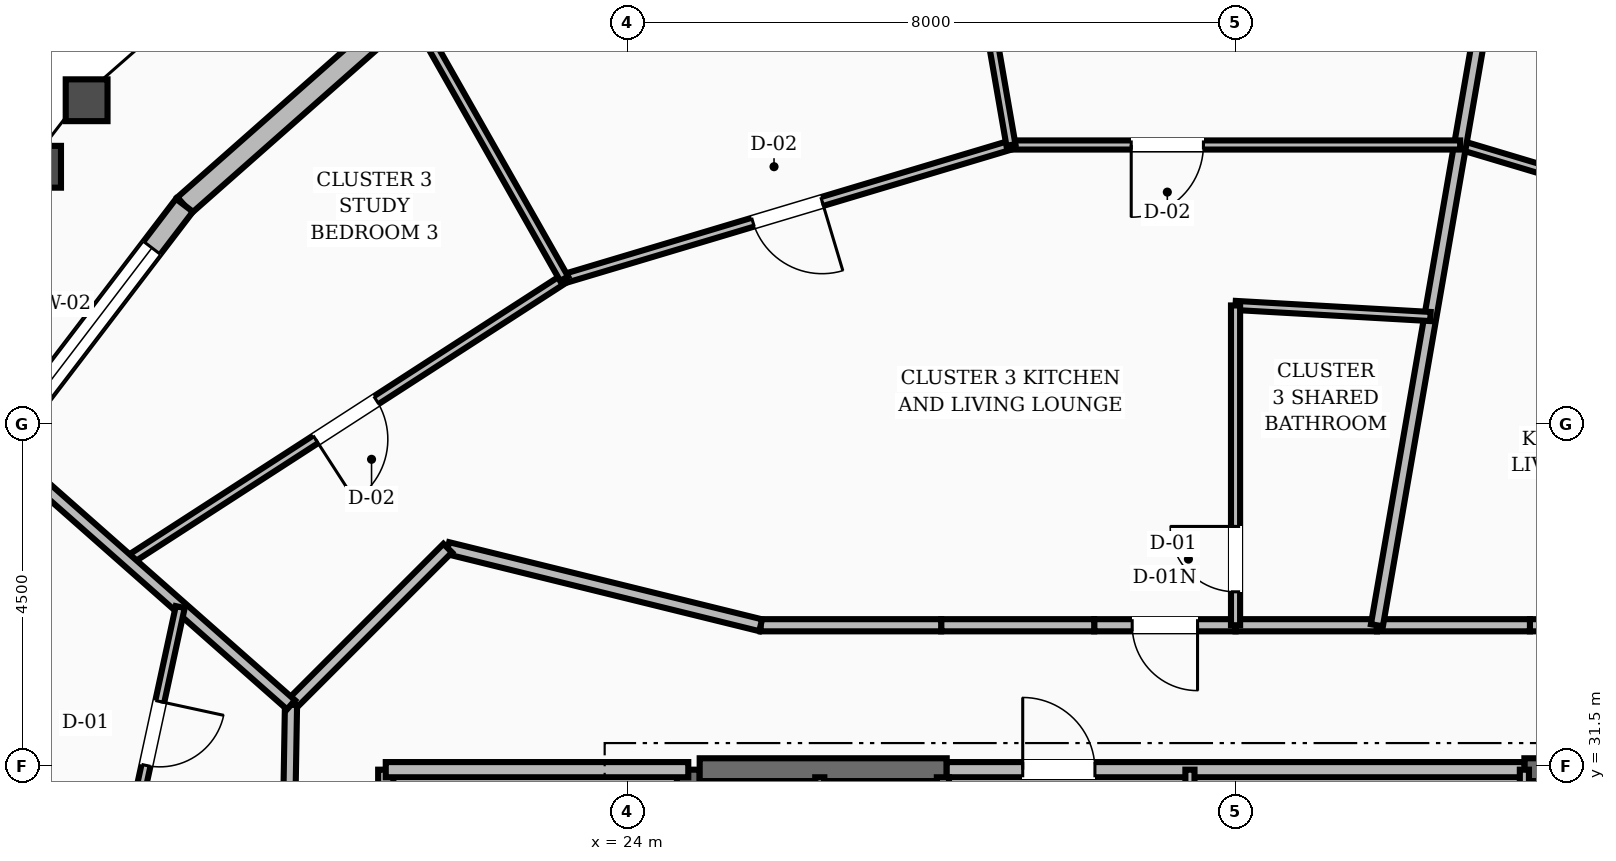
"""IFC4 building model, lengths in metres.
Left out: names, types, materials, properties, quantities, classifications, styles, units other than length and angle.
Written with IfcOpenShell. Run it as: python <this file> out.ifc"""

import sys

from ifc_helpers import new_model, si_unit, direction, frame, frame_2d, origin, place, context, subcontext, project, spatial, rectangle, extrude, element, fill, save


model = new_model("IFC4")
c1 = context("Model", 3, precision=1e-05, world=origin(), true_north=direction((0.0, 1.0)))
c2 = subcontext(c1, "Body", "Model", "MODEL_VIEW")
j1 = project(units=[si_unit("LENGTHUNIT", "METRE"), si_unit("PLANEANGLEUNIT", "RADIAN")], contexts=[c1])
p1 = place(None, origin())
s1 = spatial("IfcSite", under=j1, at=p1, CompositionType="ELEMENT")
p2 = place(p1, origin())
s2 = spatial("IfcBuilding", under=s1, at=p2, CompositionType="ELEMENT")
p3 = place(p2, frame((0.0, 0.0, 268.8)))
s3 = spatial("IfcBuildingStorey", under=s2, at=p3, CompositionType="ELEMENT", Elevation=268.8)
p4 = place(p3, frame((24.8, 25.15, 0.0), z_axis=(0.0, 0.0, 1.0), x_axis=(0.0, 1.0, 0.0)))
e1 = element("IfcWall", 1, at=p4, inside=s3, PredefinedType="SHEAR", context=c2, shape_type="SweptSolid", body=[
    extrude(rectangle(XDim=6.3, YDim=0.3, at=frame_2d((3.15, 0.0))), origin(), (0.0, 0.0, 1.0), 3.6),
])
p5 = place(p3, frame((24.95, 31.45, 0.0), z_axis=(0.0, 0.0, 1.0), x_axis=(1.0, 0.0, 0.0)))
e2 = element("IfcWall", 2, at=p5, inside=s3, PredefinedType="SHEAR", context=c2, shape_type="SweptSolid", body=[
    extrude(rectangle(XDim=3.25, YDim=0.3, at=frame_2d((1.625, 0.0))), origin(), (0.0, 0.0, 1.0), 3.6),
])
p6 = place(p3, frame((35.8, 31.45, 0.0), z_axis=(0.0, 0.0, 1.0), x_axis=(1.0, 0.0, 0.0)))
e3 = element("IfcWall", 3, at=p6, inside=s3, PredefinedType="SHEAR", context=c2, shape_type="SweptSolid", body=[
    extrude(rectangle(XDim=3.25, YDim=0.3, at=frame_2d((1.625, 0.0))), origin(), (0.0, 0.0, 1.0), 3.6),
])
p7 = place(p6, frame((0.3, 0.0, 0.0)))
e4 = element("IfcOpeningElement", 4, at=p7, cuts=e3, PredefinedType="OPENING", context=c2, shape_type="SweptSolid", body=[
    extrude(rectangle(XDim=1.1, YDim=2.1, at=frame_2d((0.55, 1.05))), frame((0.0, 0.16, 0.0), z_axis=(0.0, -1.0, 0.0), x_axis=(1.0, 0.0, 0.0)), (0.0, 0.0, 1.0), 0.32),
])
p8 = place(p3, frame((21.135, 41.492, 0.0), z_axis=(0.0, 0.0, 1.0), x_axis=(-0.749653985562, -0.661829964515, 0.0)))
e5 = element("IfcWall", 5, at=p8, inside=s3, PredefinedType="STANDARD", context=c2, shape_type="SweptSolid", body=[
    extrude(rectangle(XDim=3.953, YDim=0.28, at=frame_2d((1.977, 0.0))), origin(), (0.0, 0.0, 1.0), 2.88),
])
p9 = place(p3, frame((18.171, 38.875, 0.0), z_axis=(0.0, 0.0, 1.0), x_axis=(-0.606584214855, -0.795019238942, 0.0)))
e6 = element("IfcWall", 6, at=p9, inside=s3, PredefinedType="STANDARD", context=c2, shape_type="SweptSolid", body=[
    extrude(rectangle(XDim=4.01, YDim=0.28, at=frame_2d((2.005, 0.0))), origin(), (0.0, 0.0, 1.0), 2.88),
])
p10 = place(p9, frame((0.705, 0.0, 0.8)))
e7 = element("IfcOpeningElement", 7, at=p10, cuts=e6, PredefinedType="OPENING", context=c2, shape_type="SweptSolid", body=[
    extrude(rectangle(XDim=2.6, YDim=1.65, at=frame_2d((1.3, 0.825))), frame((0.0, 0.15, 0.0), z_axis=(0.0, -1.0, 0.0), x_axis=(1.0, 0.0, 0.0)), (0.0, 0.0, 1.0), 0.3),
])
p11 = place(p3, frame((20.82, 28.32, 0.0), z_axis=(0.0, 0.0, 1.0), x_axis=(0.0, 1.0, 0.0)))
e8 = element("IfcWall", 8, at=p11, inside=s3, PredefinedType="SOLIDWALL", context=c2, shape_type="SweptSolid", body=[
    extrude(rectangle(XDim=3.13, YDim=0.2, at=frame_2d((1.565, 0.0))), origin(), (0.0, 0.0, 1.0), 2.87),
])
p12 = place(p11, frame((1.09, 0.0, 0.0)))
e9 = element("IfcOpeningElement", 9, at=p12, cuts=e8, PredefinedType="OPENING", context=c2, shape_type="SweptSolid", body=[
    extrude(rectangle(XDim=0.95, YDim=2.1, at=frame_2d((0.475, 1.05))), frame((0.0, 0.11, 0.0), z_axis=(0.0, -1.0, 0.0), x_axis=(1.0, 0.0, 0.0)), (0.0, 0.0, 1.0), 0.22),
])
p13 = place(p3, frame((20.82, 31.45, 0.0), z_axis=(0.0, 0.0, 1.0), x_axis=(1.0, 0.0, 0.0)))
e10 = element("IfcWall", 10, at=p13, inside=s3, PredefinedType="SOLIDWALL", context=c2, shape_type="SweptSolid", body=[
    extrude(rectangle(XDim=3.98, YDim=0.2, at=frame_2d((1.99, 0.0))), origin(), (0.0, 0.0, 1.0), 2.87),
])
p14 = place(p3, frame((28.2, 31.45, 0.0), z_axis=(0.0, 0.0, 1.0), x_axis=(1.0, 0.0, 0.0)))
e11 = element("IfcWall", 11, at=p14, inside=s3, PredefinedType="SOLIDWALL", context=c2, shape_type="SweptSolid", body=[
    extrude(rectangle(XDim=7.6, YDim=0.2, at=frame_2d((3.8, 0.0))), origin(), (0.0, 0.0, 1.0), 2.87),
])
p15 = place(p14, frame((1.0, 0.0, 0.0)))
e12 = element("IfcOpeningElement", 12, at=p15, cuts=e11, PredefinedType="OPENING", context=c2, shape_type="SweptSolid", body=[
    extrude(rectangle(XDim=0.95, YDim=2.1, at=frame_2d((0.475, 1.05))), frame((0.0, 0.11, 0.0), z_axis=(0.0, -1.0, 0.0), x_axis=(1.0, 0.0, 0.0)), (0.0, 0.0, 1.0), 0.22),
])
p16 = place(p3, frame((35.8, 27.95, 0.0), z_axis=(0.0, 0.0, 1.0), x_axis=(0.0, 1.0, 0.0)))
e13 = element("IfcWall", 13, at=p16, inside=s3, PredefinedType="PARTITIONING", context=c2, shape_type="SweptSolid", body=[
    extrude(rectangle(XDim=3.5, YDim=0.12, at=frame_2d((1.75, 0.0))), origin(), (0.0, 0.0, 1.0), 2.87),
])
p17 = place(p16, frame((1.275, 0.0, 0.0)))
e14 = element("IfcOpeningElement", 14, at=p17, cuts=e13, PredefinedType="OPENING", context=c2, shape_type="SweptSolid", body=[
    extrude(rectangle(XDim=0.95, YDim=2.1, at=frame_2d((0.475, 1.05))), frame((0.0, 0.07, 0.0), z_axis=(0.0, -1.0, 0.0), x_axis=(1.0, 0.0, 0.0)), (0.0, 0.0, 1.0), 0.14),
])
p18 = place(p3, frame((31.4, 27.95, 0.0), z_axis=(0.0, 0.0, 1.0), x_axis=(0.0, 1.0, 0.0)))
e15 = element("IfcWall", 15, at=p18, inside=s3, PredefinedType="PARTITIONING", context=c2, shape_type="SweptSolid", body=[
    extrude(rectangle(XDim=3.5, YDim=0.12, at=frame_2d((1.75, 0.0))), origin(), (0.0, 0.0, 1.0), 2.87),
])
p19 = place(p3, frame((28.15, 25.25, 0.0), z_axis=(0.0, 0.0, 1.0), x_axis=(0.0, 1.0, 0.0)))
e16 = element("IfcWall", 16, at=p19, inside=s3, PredefinedType="SOLIDWALL", context=c2, shape_type="SweptSolid", body=[
    extrude(rectangle(XDim=6.1, YDim=0.16, at=frame_2d((3.05, 0.0))), origin(), (0.0, 0.0, 1.0), 2.87),
])
p20 = place(p3, frame((26.53, 25.25, 0.0), z_axis=(0.0, 0.0, 1.0), x_axis=(0.0, 1.0, 0.0)))
e17 = element("IfcWall", 17, at=p20, inside=s3, PredefinedType="PARTITIONING", context=c2, shape_type="SweptSolid", body=[
    extrude(rectangle(XDim=6.1, YDim=0.12, at=frame_2d((3.05, 0.0))), origin(), (0.0, 0.0, 1.0), 2.87),
])
p21 = place(p3, frame((38.248, 33.35, 0.0), z_axis=(0.0, 0.0, 1.0), x_axis=(-1.0, 0.0, 0.0)))
e18 = element("IfcWall", 18, at=p21, inside=s3, PredefinedType="SOLIDWALL", context=c2, shape_type="SweptSolid", body=[
    extrude(rectangle(XDim=2.375, YDim=0.16, at=frame_2d((1.188, 0.0))), origin(), (0.0, 0.0, 1.0), 2.87),
])
p22 = place(p3, frame((35.873, 33.35, 0.0), z_axis=(0.0, 0.0, 1.0), x_axis=(-1.0, 0.0, 0.0)))
e19 = element("IfcWall", 19, at=p22, inside=s3, PredefinedType="SOLIDWALL", context=c2, shape_type="SweptSolid", body=[
    extrude(rectangle(XDim=2.013, YDim=0.16, at=frame_2d((1.006, 0.0))), origin(), (0.0, 0.0, 1.0), 2.87),
])
p23 = place(p3, frame((33.86, 33.35, 0.0), z_axis=(0.0, 0.0, 1.0), x_axis=(-1.0, 0.0, 0.0)))
e20 = element("IfcWall", 20, at=p23, inside=s3, PredefinedType="SOLIDWALL", context=c2, shape_type="SweptSolid", body=[
    extrude(rectangle(XDim=1.86, YDim=0.16, at=frame_2d((0.93, 0.0))), origin(), (0.0, 0.0, 1.0), 2.87),
])
p24 = place(p3, frame((32.0, 33.35, 0.0), z_axis=(0.0, 0.0, 1.0), x_axis=(-1.0, 0.0, 0.0)))
e21 = element("IfcWall", 21, at=p24, inside=s3, PredefinedType="SOLIDWALL", context=c2, shape_type="SweptSolid", body=[
    extrude(rectangle(XDim=1.86, YDim=0.16, at=frame_2d((0.93, 0.0))), origin(), (0.0, 0.0, 1.0), 2.87),
])
p25 = place(p24, frame((0.5, 0.0, 0.0)))
e22 = element("IfcOpeningElement", 22, at=p25, cuts=e21, PredefinedType="OPENING", context=c2, shape_type="SweptSolid", body=[
    extrude(rectangle(XDim=0.86, YDim=2.1, at=frame_2d((0.43, 1.05))), frame((0.0, 0.09, 0.0), z_axis=(0.0, -1.0, 0.0), x_axis=(1.0, 0.0, 0.0)), (0.0, 0.0, 1.0), 0.18),
])
p26 = place(p3, frame((30.14, 33.35, 0.0), z_axis=(0.0, 0.0, 1.0), x_axis=(-1.0, 0.0, 0.0)))
e23 = element("IfcWall", 23, at=p26, inside=s3, PredefinedType="SOLIDWALL", context=c2, shape_type="SweptSolid", body=[
    extrude(rectangle(XDim=2.013, YDim=0.16, at=frame_2d((1.006, 0.0))), origin(), (0.0, 0.0, 1.0), 2.87),
])
p27 = place(p3, frame((28.127, 33.35, 0.0), z_axis=(0.0, 0.0, 1.0), x_axis=(-1.0, 0.0, 0.0)))
e24 = element("IfcWall", 24, at=p27, inside=s3, PredefinedType="SOLIDWALL", context=c2, shape_type="SweptSolid", body=[
    extrude(rectangle(XDim=2.375, YDim=0.16, at=frame_2d((1.188, 0.0))), origin(), (0.0, 0.0, 1.0), 2.87),
])
p28 = place(p3, frame((25.752, 33.35, 0.0), z_axis=(0.0, 0.0, 1.0), x_axis=(-0.970939799552, 0.239323850978, 0.0)))
e25 = element("IfcWall", 25, at=p28, inside=s3, PredefinedType="SOLIDWALL", context=c2, shape_type="SweptSolid", body=[
    extrude(rectangle(XDim=4.241, YDim=0.16, at=frame_2d((2.12, 0.0))), origin(), (0.0, 0.0, 1.0), 2.87),
])
p29 = place(p3, frame((21.635, 34.365, 0.0), z_axis=(0.0, 0.0, 1.0), x_axis=(-0.707106781187, -0.707106781187, 0.0)))
e26 = element("IfcWall", 26, at=p29, inside=s3, PredefinedType="SOLIDWALL", context=c2, shape_type="SweptSolid", body=[
    extrude(rectangle(XDim=2.916, YDim=0.16, at=frame_2d((1.458, 0.0))), origin(), (0.0, 0.0, 1.0), 2.87),
])
p30 = place(p3, frame((19.573, 32.303, 0.0), z_axis=(0.0, 0.0, 1.0), x_axis=(-0.016981035134, -0.999855811828, 0.0)))
e27 = element("IfcWall", 27, at=p30, inside=s3, PredefinedType="SOLIDWALL", context=c2, shape_type="SweptSolid", body=[
    extrude(rectangle(XDim=3.134, YDim=0.16, at=frame_2d((1.567, 0.0))), origin(), (0.0, 0.0, 1.0), 2.87),
])
p31 = place(p3, frame((40.833, 37.909, 0.0), z_axis=(0.0, 0.0, 1.0), x_axis=(-0.958019889786, 0.28670174533, 0.0)))
e28 = element("IfcWall", 28, at=p31, inside=s3, PredefinedType="PARTITIONING", context=c2, shape_type="SweptSolid", body=[
    extrude(rectangle(XDim=6.136, YDim=0.12, at=frame_2d((3.068, 0.0))), origin(), (0.0, 0.0, 1.0), 2.87),
])
p32 = place(p31, frame((2.593, 0.0, 0.0)))
e29 = element("IfcOpeningElement", 29, at=p32, cuts=e28, PredefinedType="OPENING", context=c2, shape_type="SweptSolid", body=[
    extrude(rectangle(XDim=0.95, YDim=2.1, at=frame_2d((0.475, 1.05))), frame((0.0, 0.07, 0.0), z_axis=(0.0, -1.0, 0.0), x_axis=(1.0, 0.0, 0.0)), (0.0, 0.0, 1.0), 0.14),
])
p33 = place(p3, frame((33.86, 33.35, 0.0), z_axis=(0.0, 0.0, 1.0), x_axis=(0.170778130505, 0.98530950982, 0.0)))
e30 = element("IfcWall", 30, at=p33, inside=s3, PredefinedType="SOLIDWALL", context=c2, shape_type="SweptSolid", body=[
    extrude(rectangle(XDim=11.401, YDim=0.16, at=frame_2d((5.7, 0.0))), origin(), (0.0, 0.0, 1.0), 2.87),
])
p34 = place(p3, frame((34.564, 37.412, 0.0), z_axis=(0.0, 0.0, 1.0), x_axis=(-0.998393230763, 0.056665304784, 0.0)))
e31 = element("IfcWall", 31, at=p34, inside=s3, PredefinedType="PARTITIONING", context=c2, shape_type="SweptSolid", body=[
    extrude(rectangle(XDim=2.568, YDim=0.12, at=frame_2d((1.284, 0.0))), origin(), (0.0, 0.0, 1.0), 2.87),
])
p35 = place(p3, frame((32.0, 33.35, 0.0), z_axis=(0.0, 0.0, 1.0), x_axis=(0.0, 1.0, 0.0)))
e32 = element("IfcWall", 32, at=p35, inside=s3, PredefinedType="PARTITIONING", context=c2, shape_type="SweptSolid", body=[
    extrude(rectangle(XDim=4.207, YDim=0.12, at=frame_2d((2.104, 0.0))), origin(), (0.0, 0.0, 1.0), 2.87),
])
p36 = place(p35, frame((0.44, 0.0, 0.0)))
e33 = element("IfcOpeningElement", 33, at=p36, cuts=e32, PredefinedType="OPENING", context=c2, shape_type="SweptSolid", body=[
    extrude(rectangle(XDim=0.86, YDim=2.1, at=frame_2d((0.43, 1.05))), frame((0.0, 0.07, 0.0), z_axis=(0.0, -1.0, 0.0), x_axis=(1.0, 0.0, 0.0)), (0.0, 0.0, 1.0), 0.14),
])
p37 = place(p3, frame((34.955, 39.668, 0.0), z_axis=(0.0, 0.0, 1.0), x_axis=(-1.0, 0.0, 0.0)))
e34 = element("IfcWall", 34, at=p37, inside=s3, PredefinedType="PARTITIONING", context=c2, shape_type="SweptSolid", body=[
    extrude(rectangle(XDim=5.91, YDim=0.12, at=frame_2d((2.955, 0.0))), origin(), (0.0, 0.0, 1.0), 2.87),
])
p38 = place(p37, frame((3.377, 0.0, 0.0)))
e35 = element("IfcOpeningElement", 35, at=p38, cuts=e34, PredefinedType="OPENING", context=c2, shape_type="SweptSolid", body=[
    extrude(rectangle(XDim=0.95, YDim=2.1, at=frame_2d((0.475, 1.05))), frame((0.0, 0.07, 0.0), z_axis=(0.0, -1.0, 0.0), x_axis=(1.0, 0.0, 0.0)), (0.0, 0.0, 1.0), 0.14),
])
p39 = place(p3, frame((29.045, 39.668, 0.0), z_axis=(0.0, 0.0, 1.0), x_axis=(-0.958019889786, -0.28670174533, 0.0)))
e36 = element("IfcWall", 36, at=p39, inside=s3, PredefinedType="PARTITIONING", context=c2, shape_type="SweptSolid", body=[
    extrude(rectangle(XDim=6.136, YDim=0.12, at=frame_2d((3.068, 0.0))), origin(), (0.0, 0.0, 1.0), 2.87),
])
p40 = place(p39, frame((2.593, 0.0, 0.0)))
e37 = element("IfcOpeningElement", 37, at=p40, cuts=e36, PredefinedType="OPENING", context=c2, shape_type="SweptSolid", body=[
    extrude(rectangle(XDim=0.95, YDim=2.1, at=frame_2d((0.475, 1.05))), frame((0.0, 0.07, 0.0), z_axis=(0.0, -1.0, 0.0), x_axis=(1.0, 0.0, 0.0)), (0.0, 0.0, 1.0), 0.14),
])
p41 = place(p3, frame((29.045, 39.668, 0.0), z_axis=(0.0, 0.0, 1.0), x_axis=(-0.170808263467, 0.985304286569, 0.0)))
e38 = element("IfcWall", 38, at=p41, inside=s3, PredefinedType="PARTITIONING", context=c2, shape_type="SweptSolid", body=[
    extrude(rectangle(XDim=4.988, YDim=0.12, at=frame_2d((2.494, 0.0))), origin(), (0.0, 0.0, 1.0), 2.87),
])
p42 = place(p3, frame((23.167, 37.909, 0.0), z_axis=(0.0, 0.0, 1.0), x_axis=(-0.83981921831, -0.542866171866, 0.0)))
e39 = element("IfcWall", 39, at=p42, inside=s3, PredefinedType="PARTITIONING", context=c2, shape_type="SweptSolid", body=[
    extrude(rectangle(XDim=6.835, YDim=0.12, at=frame_2d((3.418, 0.0))), origin(), (0.0, 0.0, 1.0), 2.87),
])
p43 = place(p42, frame((2.943, 0.0, 0.0)))
e40 = element("IfcOpeningElement", 40, at=p43, cuts=e39, PredefinedType="OPENING", context=c2, shape_type="SweptSolid", body=[
    extrude(rectangle(XDim=0.95, YDim=2.1, at=frame_2d((0.475, 1.05))), frame((0.0, 0.07, 0.0), z_axis=(0.0, -1.0, 0.0), x_axis=(1.0, 0.0, 0.0)), (0.0, 0.0, 1.0), 0.14),
])
p44 = place(p3, frame((23.167, 37.909, 0.0), z_axis=(0.0, 0.0, 1.0), x_axis=(-0.493338072586, 0.869837655047, 0.0)))
e41 = element("IfcWall", 41, at=p44, inside=s3, PredefinedType="PARTITIONING", context=c2, shape_type="SweptSolid", body=[
    extrude(rectangle(XDim=4.068, YDim=0.12, at=frame_2d((2.034, 0.0))), origin(), (0.0, 0.0, 1.0), 2.87),
])
p45 = place(p3, frame((19.573, 32.303, 0.0), z_axis=(0.0, 0.0, 1.0), x_axis=(-0.749729511221, 0.661744406856, 0.0)))
e42 = element("IfcWall", 42, at=p45, inside=s3, PredefinedType="SOLIDWALL", context=c2, shape_type="SweptSolid", body=[
    extrude(rectangle(XDim=5.064, YDim=0.16, at=frame_2d((2.532, 0.0))), origin(), (0.0, 0.0, 1.0), 2.87),
])
p46 = place(p3, frame((18.116, 33.589, 0.0), z_axis=(0.0, 0.0, 1.0), x_axis=(-0.211547716105, -0.977367670742, 0.0)))
e43 = element("IfcWall", 43, at=p46, inside=s3, PredefinedType="PARTITIONING", context=c2, shape_type="SweptSolid", body=[
    extrude(rectangle(XDim=3.402, YDim=0.12, at=frame_2d((1.701, 0.0))), origin(), (0.0, 0.0, 1.0), 2.87),
])
p47 = place(p46, frame((1.271, 0.0, 0.0)))
e44 = element("IfcOpeningElement", 44, at=p47, cuts=e43, PredefinedType="OPENING", context=c2, shape_type="SweptSolid", body=[
    extrude(rectangle(XDim=0.86, YDim=2.1, at=frame_2d((0.43, 1.05))), frame((0.0, 0.07, 0.0), z_axis=(0.0, -1.0, 0.0), x_axis=(1.0, 0.0, 0.0)), (0.0, 0.0, 1.0), 0.14),
])
p48 = place(p10, origin())
e45 = element("IfcWindow", 45, at=p48, inside=s3, PartitioningType="SINGLE_PANEL", PredefinedType="WINDOW", context=c2, shape_type="SweptSolid", body=[
    extrude(rectangle(XDim=2.6, YDim=1.65, at=frame_2d((1.3, 0.825))), frame((0.0, 0.03, 0.0), z_axis=(0.0, -1.0, 0.0), x_axis=(1.0, 0.0, 0.0)), (0.0, 0.0, 1.0), 0.06),
])
fill(e7, e45)
p49 = place(p15, origin())
e46 = element("IfcDoor", 46, at=p49, inside=s3, OperationType="SINGLE_SWING_LEFT", PredefinedType="DOOR", context=c2, shape_type="SweptSolid", body=[
    extrude(rectangle(XDim=0.95, YDim=2.1, at=frame_2d((0.475, 1.05))), frame((0.0, 0.025, 0.0), z_axis=(0.0, -1.0, 0.0), x_axis=(1.0, 0.0, 0.0)), (0.0, 0.0, 1.0), 0.05),
])
fill(e12, e46)
p50 = place(p36, origin())
e47 = element("IfcDoor", 47, at=p50, inside=s3, OperationType="SINGLE_SWING_RIGHT", PredefinedType="DOOR", context=c2, shape_type="SweptSolid", body=[
    extrude(rectangle(XDim=0.86, YDim=2.1, at=frame_2d((0.43, 1.05))), frame((0.0, 0.025, 0.0), z_axis=(0.0, -1.0, 0.0), x_axis=(1.0, 0.0, 0.0)), (0.0, 0.0, 1.0), 0.05),
])
fill(e33, e47)
p51 = place(p25, origin())
e48 = element("IfcDoor", 48, at=p51, inside=s3, OperationType="SINGLE_SWING_LEFT", PredefinedType="DOOR", context=c2, shape_type="SweptSolid", body=[
    extrude(rectangle(XDim=0.86, YDim=2.1, at=frame_2d((0.43, 1.05))), frame((0.0, 0.025, 0.0), z_axis=(0.0, -1.0, 0.0), x_axis=(1.0, 0.0, 0.0)), (0.0, 0.0, 1.0), 0.05),
])
fill(e22, e48)
p52 = place(p38, origin())
e49 = element("IfcDoor", 49, at=p52, inside=s3, OperationType="SINGLE_SWING_RIGHT", PredefinedType="DOOR", context=c2, shape_type="SweptSolid", body=[
    extrude(rectangle(XDim=0.95, YDim=2.1, at=frame_2d((0.475, 1.05))), frame((0.0, 0.025, 0.0), z_axis=(0.0, -1.0, 0.0), x_axis=(1.0, 0.0, 0.0)), (0.0, 0.0, 1.0), 0.05),
])
fill(e35, e49)
p53 = place(p40, origin())
e50 = element("IfcDoor", 50, at=p53, inside=s3, OperationType="SINGLE_SWING_LEFT", PredefinedType="DOOR", context=c2, shape_type="SweptSolid", body=[
    extrude(rectangle(XDim=0.95, YDim=2.1, at=frame_2d((0.475, 1.05))), frame((0.0, 0.025, 0.0), z_axis=(0.0, -1.0, 0.0), x_axis=(1.0, 0.0, 0.0)), (0.0, 0.0, 1.0), 0.05),
])
fill(e37, e50)
p54 = place(p43, origin())
e51 = element("IfcDoor", 51, at=p54, inside=s3, OperationType="SINGLE_SWING_RIGHT", PredefinedType="DOOR", context=c2, shape_type="SweptSolid", body=[
    extrude(rectangle(XDim=0.95, YDim=2.1, at=frame_2d((0.475, 1.05))), frame((0.0, 0.025, 0.0), z_axis=(0.0, -1.0, 0.0), x_axis=(1.0, 0.0, 0.0)), (0.0, 0.0, 1.0), 0.05),
])
fill(e40, e51)
p55 = place(p47, origin())
e52 = element("IfcDoor", 52, at=p55, inside=s3, OperationType="SINGLE_SWING_LEFT", PredefinedType="DOOR", context=c2, shape_type="SweptSolid", body=[
    extrude(rectangle(XDim=0.86, YDim=2.1, at=frame_2d((0.43, 1.05))), frame((0.0, 0.025, 0.0), z_axis=(0.0, -1.0, 0.0), x_axis=(1.0, 0.0, 0.0)), (0.0, 0.0, 1.0), 0.05),
])
fill(e44, e52)
save(model, sys.argv[1])
